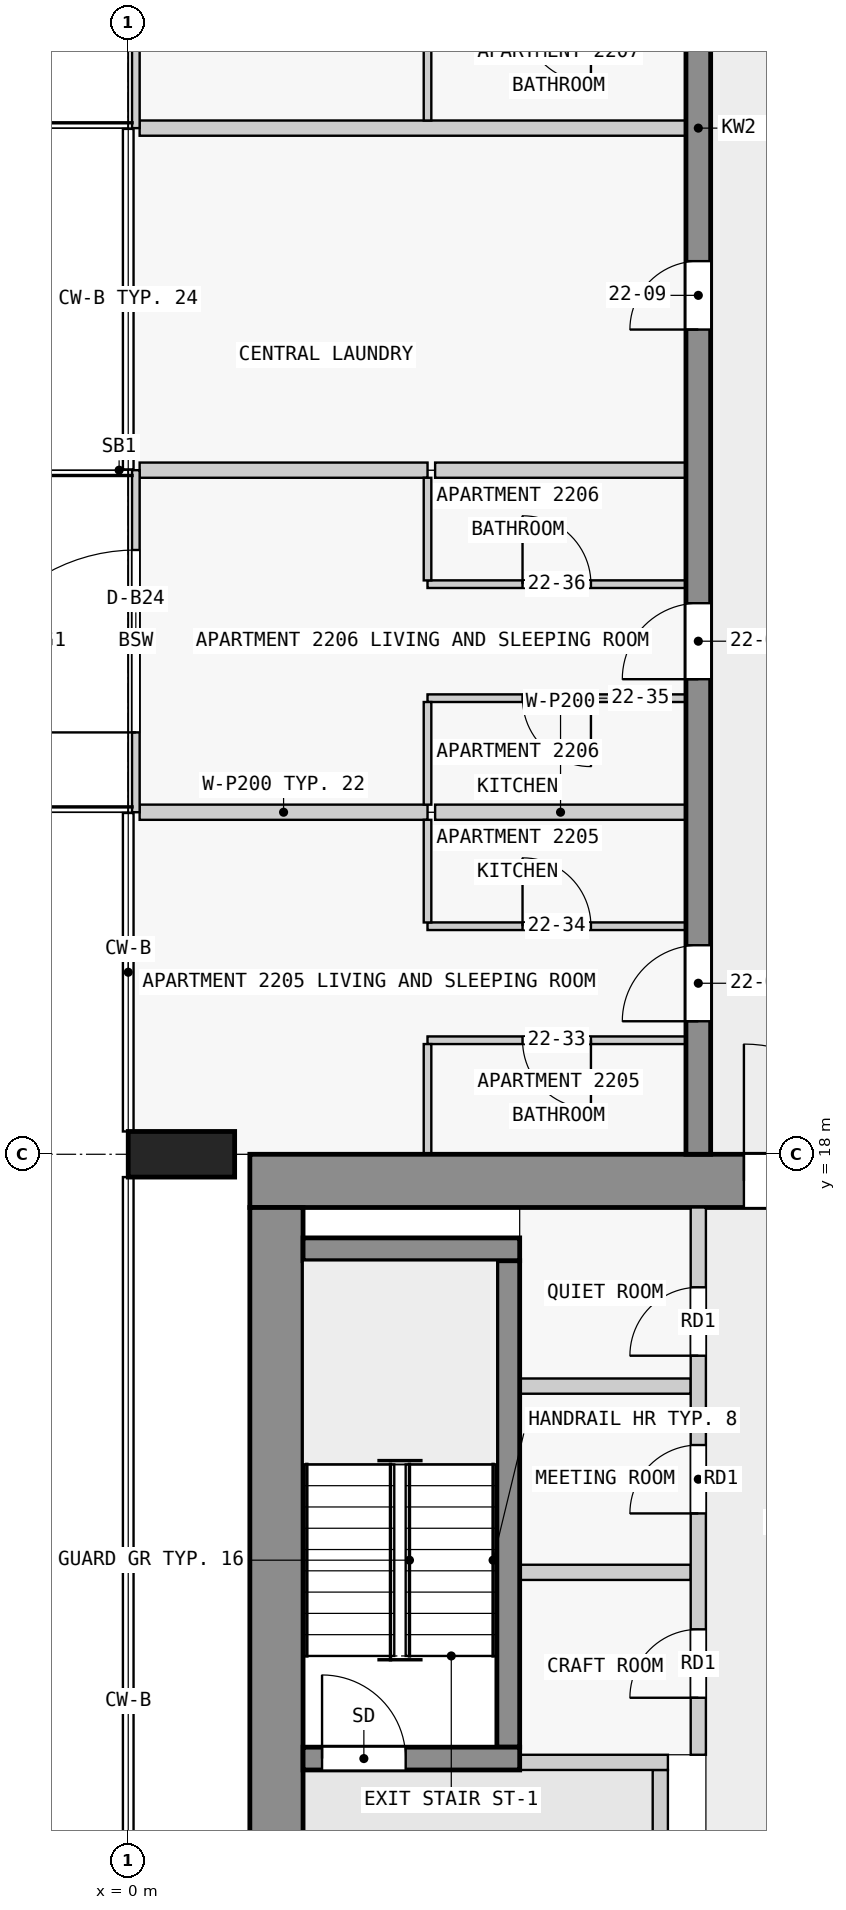
"""IFC4 building model, lengths in metres.
Left out: names, types, materials, properties, quantities, classifications, styles, units other than length and angle.
Written with IfcOpenShell. Run it as: python <this file> out.ifc"""

import sys

from ifc_helpers import new_model, si_unit, direction, frame, frame_2d, origin, origin_2d, place, context, subcontext, project, spatial, rectangle, extrude, element, fill, save


model = new_model("IFC4")
c1 = context("Model", 3, precision=1e-05, world=origin(), true_north=direction((0.0, 1.0)))
c2 = subcontext(c1, "Body", "Model", "MODEL_VIEW")
j1 = project(units=[si_unit("LENGTHUNIT", "METRE"), si_unit("PLANEANGLEUNIT", "RADIAN")], contexts=[c1])
p1 = place(None, origin())
s1 = spatial("IfcSite", under=j1, at=p1, CompositionType="ELEMENT")
p2 = place(p1, origin())
s2 = spatial("IfcBuilding", under=s1, at=p2, CompositionType="ELEMENT")
p3 = place(p2, frame((0.0, 0.0, 88.8)))
s3 = spatial("IfcBuildingStorey", under=s2, at=p3, CompositionType="ELEMENT", Elevation=88.8)
p4 = place(p3, frame((0.7, 18.0, 0.0), z_axis=(0.0, 0.0, 1.0), x_axis=(0.0, 1.0, 0.0)))
e1 = element("IfcColumn", 1, at=p4, inside=s3, PredefinedType="COLUMN", context=c2, shape_type="SweptSolid", body=[
    extrude(rectangle(XDim=0.6, YDim=1.4, at=origin_2d()), origin(), (0.0, 0.0, 1.0), 3.5),
])
p5 = place(p3, frame((1.6, 17.65, 0.0), z_axis=(0.0, 0.0, 1.0), x_axis=(1.0, 0.0, 0.0)))
e2 = element("IfcWall", 2, at=p5, inside=s3, PredefinedType="SHEAR", context=c2, shape_type="SweptSolid", body=[
    extrude(rectangle(XDim=20.9, YDim=0.7, at=frame_2d((10.45, 0.0))), origin(), (0.0, 0.0, 1.0), 3.25),
])
p6 = place(p5, frame((6.5, 0.0, 0.0)))
e3 = element("IfcOpeningElement", 3, at=p6, cuts=e2, PredefinedType="OPENING", context=c2, shape_type="SweptSolid", body=[
    extrude(rectangle(XDim=1.8, YDim=2.1, at=frame_2d((0.9, 1.05))), frame((0.0, 0.36, 0.0), z_axis=(0.0, -1.0, 0.0), x_axis=(1.0, 0.0, 0.0)), (0.0, 0.0, 1.0), 0.72),
])
p7 = place(p3, frame((1.95, 2.5, 0.0), z_axis=(0.0, 0.0, 1.0), x_axis=(0.0, 1.0, 0.0)))
e4 = element("IfcWall", 4, at=p7, inside=s3, PredefinedType="SHEAR", context=c2, shape_type="SweptSolid", body=[
    extrude(rectangle(XDim=14.8, YDim=0.7, at=frame_2d((7.4, 0.0))), origin(), (0.0, 0.0, 1.0), 3.25),
])
p8 = place(p3, frame((2.3, 10.05, 0.0), z_axis=(0.0, 0.0, 1.0), x_axis=(1.0, 0.0, 0.0)))
e5 = element("IfcWall", 5, at=p8, inside=s3, PredefinedType="SHEAR", context=c2, shape_type="SweptSolid", body=[
    extrude(rectangle(XDim=2.85, YDim=0.3, at=frame_2d((1.425, 0.0))), origin(), (0.0, 0.0, 1.0), 3.25),
])
p9 = place(p8, frame((0.25, 0.0, 0.0)))
e6 = element("IfcOpeningElement", 6, at=p9, cuts=e5, PredefinedType="OPENING", context=c2, shape_type="SweptSolid", body=[
    extrude(rectangle(XDim=1.1, YDim=2.1, at=frame_2d((0.55, 1.05))), frame((0.0, 0.16, 0.0), z_axis=(0.0, -1.0, 0.0), x_axis=(1.0, 0.0, 0.0)), (0.0, 0.0, 1.0), 0.32),
])
p10 = place(p3, frame((5.0, 10.2, 0.0), z_axis=(0.0, 0.0, 1.0), x_axis=(0.0, 1.0, 0.0)))
e7 = element("IfcWall", 7, at=p10, inside=s3, PredefinedType="SHEAR", context=c2, shape_type="SweptSolid", body=[
    extrude(rectangle(XDim=6.4, YDim=0.3, at=frame_2d((3.2, 0.0))), origin(), (0.0, 0.0, 1.0), 3.25),
])
p11 = place(p3, frame((2.3, 16.75, 0.0), z_axis=(0.0, 0.0, 1.0), x_axis=(1.0, 0.0, 0.0)))
e8 = element("IfcWall", 8, at=p11, inside=s3, PredefinedType="SHEAR", context=c2, shape_type="SweptSolid", body=[
    extrude(rectangle(XDim=2.85, YDim=0.3, at=frame_2d((1.425, 0.0))), origin(), (0.0, 0.0, 1.0), 3.25),
])
p12 = place(p3, frame((7.5, 18.0, 0.0), z_axis=(0.0, 0.0, 1.0), x_axis=(0.0, 1.0, 0.0)))
e9 = element("IfcWall", 9, at=p12, inside=s3, PredefinedType="SHEAR", context=c2, shape_type="SweptSolid", body=[
    extrude(rectangle(XDim=27.0, YDim=0.325, at=frame_2d((13.5, 0.0))), origin(), (0.0, 0.0, 1.0), 3.25),
])
p13 = place(p12, frame((1.75, 0.0, 0.0)))
e10 = element("IfcOpeningElement", 10, at=p13, cuts=e9, PredefinedType="OPENING", context=c2, shape_type="SweptSolid", body=[
    extrude(rectangle(XDim=1.0, YDim=2.1, at=frame_2d((0.5, 1.05))), frame((0.0, 0.172, 0.0), z_axis=(0.0, -1.0, 0.0), x_axis=(1.0, 0.0, 0.0)), (0.0, 0.0, 1.0), 0.345),
])
p14 = place(p12, frame((6.25, 0.0, 0.0)))
e11 = element("IfcOpeningElement", 11, at=p14, cuts=e9, PredefinedType="OPENING", context=c2, shape_type="SweptSolid", body=[
    extrude(rectangle(XDim=1.0, YDim=2.1, at=frame_2d((0.5, 1.05))), frame((0.0, 0.172, 0.0), z_axis=(0.0, -1.0, 0.0), x_axis=(1.0, 0.0, 0.0)), (0.0, 0.0, 1.0), 0.345),
])
p15 = place(p12, frame((10.85, 0.0, 0.0)))
e12 = element("IfcOpeningElement", 12, at=p15, cuts=e9, PredefinedType="OPENING", context=c2, shape_type="SweptSolid", body=[
    extrude(rectangle(XDim=0.9, YDim=2.1, at=frame_2d((0.45, 1.05))), frame((0.0, 0.172, 0.0), z_axis=(0.0, -1.0, 0.0), x_axis=(1.0, 0.0, 0.0)), (0.0, 0.0, 1.0), 0.345),
])
p16 = place(p12, frame((15.25, 0.0, 0.0)))
e13 = element("IfcOpeningElement", 13, at=p16, cuts=e9, PredefinedType="OPENING", context=c2, shape_type="SweptSolid", body=[
    extrude(rectangle(XDim=1.0, YDim=2.1, at=frame_2d((0.5, 1.05))), frame((0.0, 0.172, 0.0), z_axis=(0.0, -1.0, 0.0), x_axis=(1.0, 0.0, 0.0)), (0.0, 0.0, 1.0), 0.345),
])
p17 = place(p12, frame((19.85, 0.0, 0.0)))
e14 = element("IfcOpeningElement", 14, at=p17, cuts=e9, PredefinedType="OPENING", context=c2, shape_type="SweptSolid", body=[
    extrude(rectangle(XDim=0.9, YDim=2.1, at=frame_2d((0.45, 1.05))), frame((0.0, 0.172, 0.0), z_axis=(0.0, -1.0, 0.0), x_axis=(1.0, 0.0, 0.0)), (0.0, 0.0, 1.0), 0.345),
])
p18 = place(p12, frame((23.25, 0.0, 0.0)))
e15 = element("IfcOpeningElement", 15, at=p18, cuts=e9, PredefinedType="OPENING", context=c2, shape_type="SweptSolid", body=[
    extrude(rectangle(XDim=0.9, YDim=2.1, at=frame_2d((0.45, 1.05))), frame((0.0, 0.172, 0.0), z_axis=(0.0, -1.0, 0.0), x_axis=(1.0, 0.0, 0.0)), (0.0, 0.0, 1.0), 0.345),
])
p19 = place(p12, frame((25.45, 0.0, 0.0)))
e16 = element("IfcOpeningElement", 16, at=p19, cuts=e9, PredefinedType="OPENING", context=c2, shape_type="SweptSolid", body=[
    extrude(rectangle(XDim=1.0, YDim=2.1, at=frame_2d((0.5, 1.05))), frame((0.0, 0.172, 0.0), z_axis=(0.0, -1.0, 0.0), x_axis=(1.0, 0.0, 0.0)), (0.0, 0.0, 1.0), 0.345),
])
p20 = place(p3, frame((0.1, 22.5, 0.0), z_axis=(0.0, 0.0, 1.0), x_axis=(0.0, 1.0, 0.0)))
e17 = element("IfcWall", 17, at=p20, inside=s3, PredefinedType="STANDARD", context=c2, shape_type="SweptSolid", body=[
    extrude(rectangle(XDim=4.5, YDim=0.1, at=frame_2d((2.25, 0.0))), origin(), (0.0, 0.0, 1.0), 3.25),
])
p21 = place(p20, frame((1.05, 0.0, 0.0)))
e18 = element("IfcOpeningElement", 18, at=p21, cuts=e17, PredefinedType="OPENING", context=c2, shape_type="SweptSolid", body=[
    extrude(rectangle(XDim=2.4, YDim=2.4, at=frame_2d((1.2, 1.2))), frame((0.0, 0.06, 0.0), z_axis=(0.0, -1.0, 0.0), x_axis=(1.0, 0.0, 0.0)), (0.0, 0.0, 1.0), 0.12),
])
p22 = place(p3, frame((0.1, 31.5, 0.0), z_axis=(0.0, 0.0, 1.0), x_axis=(0.0, 1.0, 0.0)))
e19 = element("IfcWall", 19, at=p22, inside=s3, PredefinedType="STANDARD", context=c2, shape_type="SweptSolid", body=[
    extrude(rectangle(XDim=4.5, YDim=0.1, at=frame_2d((2.25, 0.0))), origin(), (0.0, 0.0, 1.0), 3.25),
])
p23 = place(p22, frame((1.05, 0.0, 0.0)))
e20 = element("IfcOpeningElement", 20, at=p23, cuts=e19, PredefinedType="OPENING", context=c2, shape_type="SweptSolid", body=[
    extrude(rectangle(XDim=2.4, YDim=2.4, at=frame_2d((1.2, 1.2))), frame((0.0, 0.06, 0.0), z_axis=(0.0, -1.0, 0.0), x_axis=(1.0, 0.0, 0.0)), (0.0, 0.0, 1.0), 0.12),
])
p24 = place(p3, frame((7.0, 5.9, 0.0), z_axis=(0.0, 0.0, 1.0), x_axis=(0.0, 1.0, 0.0)))
e21 = element("IfcWall", 21, at=p24, inside=s3, PredefinedType="PARTITIONING", context=c2, shape_type="SweptSolid", body=[
    extrude(rectangle(XDim=4.0, YDim=0.2, at=frame_2d((2.0, 0.0))), origin(), (0.0, 0.0, 1.0), 3.25),
])
p25 = place(p24, frame((0.45, 0.0, 0.0)))
e22 = element("IfcOpeningElement", 22, at=p25, cuts=e21, PredefinedType="OPENING", context=c2, shape_type="SweptSolid", body=[
    extrude(rectangle(XDim=1.1, YDim=2.1, at=frame_2d((0.55, 1.05))), frame((0.0, 0.11, 0.0), z_axis=(0.0, -1.0, 0.0), x_axis=(1.0, 0.0, 0.0)), (0.0, 0.0, 1.0), 0.22),
])
p26 = place(p3, frame((5.15, 10.0, 0.0), z_axis=(0.0, 0.0, 1.0), x_axis=(1.0, 0.0, 0.0)))
e23 = element("IfcWall", 23, at=p26, inside=s3, PredefinedType="PARTITIONING", context=c2, shape_type="SweptSolid", body=[
    extrude(rectangle(XDim=1.95, YDim=0.2, at=frame_2d((0.975, 0.0))), origin(), (0.0, 0.0, 1.0), 3.25),
])
p27 = place(p3, frame((7.5, 10.1, 0.0), z_axis=(0.0, 0.0, 1.0), x_axis=(0.0, 1.0, 0.0)))
e24 = element("IfcWall", 24, at=p27, inside=s3, PredefinedType="PARTITIONING", context=c2, shape_type="SweptSolid", body=[
    extrude(rectangle(XDim=7.2, YDim=0.2, at=frame_2d((3.6, 0.0))), origin(), (0.0, 0.0, 1.0), 3.25),
])
p28 = place(p27, frame((0.75, 0.0, 0.0)))
e25 = element("IfcOpeningElement", 25, at=p28, cuts=e24, PredefinedType="OPENING", context=c2, shape_type="SweptSolid", body=[
    extrude(rectangle(XDim=0.9, YDim=2.1, at=frame_2d((0.45, 1.05))), frame((0.0, 0.11, 0.0), z_axis=(0.0, -1.0, 0.0), x_axis=(1.0, 0.0, 0.0)), (0.0, 0.0, 1.0), 0.22),
])
p29 = place(p27, frame((3.175, 0.0, 0.0)))
e26 = element("IfcOpeningElement", 26, at=p29, cuts=e24, PredefinedType="OPENING", context=c2, shape_type="SweptSolid", body=[
    extrude(rectangle(XDim=0.9, YDim=2.1, at=frame_2d((0.45, 1.05))), frame((0.0, 0.11, 0.0), z_axis=(0.0, -1.0, 0.0), x_axis=(1.0, 0.0, 0.0)), (0.0, 0.0, 1.0), 0.22),
])
p30 = place(p27, frame((5.25, 0.0, 0.0)))
e27 = element("IfcOpeningElement", 27, at=p30, cuts=e24, PredefinedType="OPENING", context=c2, shape_type="SweptSolid", body=[
    extrude(rectangle(XDim=0.9, YDim=2.1, at=frame_2d((0.45, 1.05))), frame((0.0, 0.11, 0.0), z_axis=(0.0, -1.0, 0.0), x_axis=(1.0, 0.0, 0.0)), (0.0, 0.0, 1.0), 0.22),
])
for number, where, z_axis, x_axis in (
    (28, (5.15, 12.5, 0.0), (0.0, 0.0, 1.0), (1.0, 0.0, 0.0)),
    (29, (5.15, 14.95, 0.0), (0.0, 0.0, 1.0), (1.0, 0.0, 0.0)),
):
    element("IfcWall", number, at=place(p3, frame(where, z_axis=z_axis, x_axis=x_axis)), inside=s3, PredefinedType="PARTITIONING", context=c2, shape_type="SweptSolid", body=[
        extrude(rectangle(XDim=2.25, YDim=0.2, at=frame_2d((1.125, 0.0))), origin(), (0.0, 0.0, 1.0), 3.25),
    ])
p31 = place(p3, frame((7.337, 19.5, 0.0), z_axis=(0.0, 0.0, 1.0), x_axis=(-1.0, 0.0, 0.0)))
e30 = element("IfcWall", 30, at=p31, inside=s3, PredefinedType="PARTITIONING", context=c2, shape_type="SweptSolid", body=[
    extrude(rectangle(XDim=3.4, YDim=0.1, at=frame_2d((1.7, 0.0))), origin(), (0.0, 0.0, 1.0), 3.25),
])
p32 = place(p31, frame((1.25, 0.0, 0.0)))
e31 = element("IfcOpeningElement", 31, at=p32, cuts=e30, PredefinedType="OPENING", context=c2, shape_type="SweptSolid", body=[
    extrude(rectangle(XDim=0.9, YDim=2.1, at=frame_2d((0.45, 1.05))), frame((0.0, 0.06, 0.0), z_axis=(0.0, -1.0, 0.0), x_axis=(1.0, 0.0, 0.0)), (0.0, 0.0, 1.0), 0.12),
])
p33 = place(p3, frame((3.938, 21.0, 0.0), z_axis=(0.0, 0.0, 1.0), x_axis=(1.0, 0.0, 0.0)))
e32 = element("IfcWall", 32, at=p33, inside=s3, PredefinedType="PARTITIONING", context=c2, shape_type="SweptSolid", body=[
    extrude(rectangle(XDim=3.4, YDim=0.1, at=frame_2d((1.7, 0.0))), origin(), (0.0, 0.0, 1.0), 3.25),
])
p34 = place(p33, frame((1.25, 0.0, 0.0)))
e33 = element("IfcOpeningElement", 33, at=p34, cuts=e32, PredefinedType="OPENING", context=c2, shape_type="SweptSolid", body=[
    extrude(rectangle(XDim=0.9, YDim=2.1, at=frame_2d((0.45, 1.05))), frame((0.0, 0.06, 0.0), z_axis=(0.0, -1.0, 0.0), x_axis=(1.0, 0.0, 0.0)), (0.0, 0.0, 1.0), 0.12),
])
p35 = place(p3, frame((7.337, 22.5, 0.0), z_axis=(0.0, 0.0, 1.0), x_axis=(-1.0, 0.0, 0.0)))
e34 = element("IfcWall", 34, at=p35, inside=s3, PredefinedType="PARTITIONING", context=c2, shape_type="SweptSolid", body=[
    extrude(rectangle(XDim=3.3, YDim=0.2, at=frame_2d((1.65, 0.0))), origin(), (0.0, 0.0, 1.0), 3.25),
])
p36 = place(p3, frame((0.15, 22.5, 0.0), z_axis=(0.0, 0.0, 1.0), x_axis=(1.0, 0.0, 0.0)))
e35 = element("IfcWall", 35, at=p36, inside=s3, PredefinedType="PARTITIONING", context=c2, shape_type="SweptSolid", body=[
    extrude(rectangle(XDim=3.788, YDim=0.2, at=frame_2d((1.894, 0.0))), origin(), (0.0, 0.0, 1.0), 3.25),
])
p37 = place(p3, frame((7.337, 24.0, 0.0), z_axis=(0.0, 0.0, 1.0), x_axis=(-1.0, 0.0, 0.0)))
e36 = element("IfcWall", 36, at=p37, inside=s3, PredefinedType="PARTITIONING", context=c2, shape_type="SweptSolid", body=[
    extrude(rectangle(XDim=3.4, YDim=0.1, at=frame_2d((1.7, 0.0))), origin(), (0.0, 0.0, 1.0), 3.25),
])
p38 = place(p37, frame((1.25, 0.0, 0.0)))
e37 = element("IfcOpeningElement", 37, at=p38, cuts=e36, PredefinedType="OPENING", context=c2, shape_type="SweptSolid", body=[
    extrude(rectangle(XDim=0.9, YDim=2.1, at=frame_2d((0.45, 1.05))), frame((0.0, 0.06, 0.0), z_axis=(0.0, -1.0, 0.0), x_axis=(1.0, 0.0, 0.0)), (0.0, 0.0, 1.0), 0.12),
])
p39 = place(p3, frame((3.938, 25.5, 0.0), z_axis=(0.0, 0.0, 1.0), x_axis=(1.0, 0.0, 0.0)))
e38 = element("IfcWall", 38, at=p39, inside=s3, PredefinedType="PARTITIONING", context=c2, shape_type="SweptSolid", body=[
    extrude(rectangle(XDim=3.4, YDim=0.1, at=frame_2d((1.7, 0.0))), origin(), (0.0, 0.0, 1.0), 3.25),
])
p40 = place(p39, frame((1.25, 0.0, 0.0)))
e39 = element("IfcOpeningElement", 39, at=p40, cuts=e38, PredefinedType="OPENING", context=c2, shape_type="SweptSolid", body=[
    extrude(rectangle(XDim=0.9, YDim=2.1, at=frame_2d((0.45, 1.05))), frame((0.0, 0.06, 0.0), z_axis=(0.0, -1.0, 0.0), x_axis=(1.0, 0.0, 0.0)), (0.0, 0.0, 1.0), 0.12),
])
p41 = place(p3, frame((7.337, 27.0, 0.0), z_axis=(0.0, 0.0, 1.0), x_axis=(-1.0, 0.0, 0.0)))
e40 = element("IfcWall", 40, at=p41, inside=s3, PredefinedType="PARTITIONING", context=c2, shape_type="SweptSolid", body=[
    extrude(rectangle(XDim=3.3, YDim=0.2, at=frame_2d((1.65, 0.0))), origin(), (0.0, 0.0, 1.0), 3.25),
])
p42 = place(p3, frame((0.15, 27.0, 0.0), z_axis=(0.0, 0.0, 1.0), x_axis=(1.0, 0.0, 0.0)))
e41 = element("IfcWall", 41, at=p42, inside=s3, PredefinedType="PARTITIONING", context=c2, shape_type="SweptSolid", body=[
    extrude(rectangle(XDim=3.788, YDim=0.2, at=frame_2d((1.894, 0.0))), origin(), (0.0, 0.0, 1.0), 3.25),
])
p43 = place(p3, frame((7.337, 31.5, 0.0), z_axis=(0.0, 0.0, 1.0), x_axis=(-1.0, 0.0, 0.0)))
e42 = element("IfcWall", 42, at=p43, inside=s3, PredefinedType="PARTITIONING", context=c2, shape_type="SweptSolid", body=[
    extrude(rectangle(XDim=7.188, YDim=0.2, at=frame_2d((3.594, 0.0))), origin(), (0.0, 0.0, 1.0), 3.25),
])
p44 = place(p3, frame((3.938, 19.45, 0.0), z_axis=(0.0, 0.0, 1.0), x_axis=(0.0, -1.0, 0.0)))
e43 = element("IfcWall", 43, at=p44, inside=s3, PredefinedType="PARTITIONING", context=c2, shape_type="SweptSolid", body=[
    extrude(rectangle(XDim=1.45, YDim=0.1, at=frame_2d((0.725, 0.0))), origin(), (0.0, 0.0, 1.0), 3.25),
])
for number, where, z_axis, x_axis in (
    (44, (3.938, 22.4, 0.0), (0.0, 0.0, 1.0), (0.0, -1.0, 0.0)),
    (45, (3.938, 23.95, 0.0), (0.0, 0.0, 1.0), (0.0, -1.0, 0.0)),
    (46, (3.938, 26.9, 0.0), (0.0, 0.0, 1.0), (0.0, -1.0, 0.0)),
    (47, (3.938, 32.95, 0.0), (0.0, 0.0, 1.0), (0.0, -1.0, 0.0)),
):
    element("IfcWall", number, at=place(p3, frame(where, z_axis=z_axis, x_axis=x_axis)), inside=s3, PredefinedType="PARTITIONING", context=c2, shape_type="SweptSolid", body=[
        extrude(rectangle(XDim=1.35, YDim=0.1, at=frame_2d((0.675, 0.0))), origin(), (0.0, 0.0, 1.0), 3.25),
    ])
p45 = place(p21, origin())
e48 = element("IfcDoor", 48, at=p45, inside=s3, OperationType="SINGLE_SWING_LEFT", PredefinedType="DOOR", context=c2, shape_type="SweptSolid", body=[
    extrude(rectangle(XDim=2.4, YDim=2.4, at=frame_2d((1.2, 1.2))), frame((0.0, 0.025, 0.0), z_axis=(0.0, -1.0, 0.0), x_axis=(1.0, 0.0, 0.0)), (0.0, 0.0, 1.0), 0.05),
])
fill(e18, e48)
p46 = place(p9, origin())
e49 = element("IfcDoor", 49, at=p46, inside=s3, OperationType="SINGLE_SWING_RIGHT", PredefinedType="DOOR", context=c2, shape_type="SweptSolid", body=[
    extrude(rectangle(XDim=1.1, YDim=2.1, at=frame_2d((0.55, 1.05))), frame((0.0, 0.025, 0.0), z_axis=(0.0, -1.0, 0.0), x_axis=(1.0, 0.0, 0.0)), (0.0, 0.0, 1.0), 0.05),
])
fill(e6, e49)
p47 = place(p6, origin())
e50 = element("IfcDoor", 50, at=p47, inside=s3, OperationType="DOUBLE_DOOR_SINGLE_SWING", PredefinedType="DOOR", context=c2, shape_type="SweptSolid", body=[
    extrude(rectangle(XDim=1.8, YDim=2.1, at=frame_2d((0.9, 1.05))), frame((0.0, 0.025, 0.0), z_axis=(0.0, -1.0, 0.0), x_axis=(1.0, 0.0, 0.0)), (0.0, 0.0, 1.0), 0.05),
])
fill(e3, e50)
p48 = place(p28, origin())
e51 = element("IfcDoor", 51, at=p48, inside=s3, OperationType="SINGLE_SWING_RIGHT", PredefinedType="DOOR", context=c2, shape_type="SweptSolid", body=[
    extrude(rectangle(XDim=0.9, YDim=2.1, at=frame_2d((0.45, 1.05))), frame((0.0, 0.025, 0.0), z_axis=(0.0, -1.0, 0.0), x_axis=(1.0, 0.0, 0.0)), (0.0, 0.0, 1.0), 0.05),
])
fill(e25, e51)
p49 = place(p29, origin())
e52 = element("IfcDoor", 52, at=p49, inside=s3, OperationType="SINGLE_SWING_RIGHT", PredefinedType="DOOR", context=c2, shape_type="SweptSolid", body=[
    extrude(rectangle(XDim=0.9, YDim=2.1, at=frame_2d((0.45, 1.05))), frame((0.0, 0.025, 0.0), z_axis=(0.0, -1.0, 0.0), x_axis=(1.0, 0.0, 0.0)), (0.0, 0.0, 1.0), 0.05),
])
fill(e26, e52)
p50 = place(p30, origin())
e53 = element("IfcDoor", 53, at=p50, inside=s3, OperationType="SINGLE_SWING_RIGHT", PredefinedType="DOOR", context=c2, shape_type="SweptSolid", body=[
    extrude(rectangle(XDim=0.9, YDim=2.1, at=frame_2d((0.45, 1.05))), frame((0.0, 0.025, 0.0), z_axis=(0.0, -1.0, 0.0), x_axis=(1.0, 0.0, 0.0)), (0.0, 0.0, 1.0), 0.05),
])
fill(e27, e53)
p51 = place(p13, origin())
e54 = element("IfcDoor", 54, at=p51, inside=s3, OperationType="SINGLE_SWING_LEFT", PredefinedType="DOOR", context=c2, shape_type="SweptSolid", body=[
    extrude(rectangle(XDim=1.0, YDim=2.1, at=frame_2d((0.5, 1.05))), frame((0.0, 0.025, 0.0), z_axis=(0.0, -1.0, 0.0), x_axis=(1.0, 0.0, 0.0)), (0.0, 0.0, 1.0), 0.05),
])
fill(e10, e54)
p52 = place(p14, origin())
e55 = element("IfcDoor", 55, at=p52, inside=s3, OperationType="SINGLE_SWING_LEFT", PredefinedType="DOOR", context=c2, shape_type="SweptSolid", body=[
    extrude(rectangle(XDim=1.0, YDim=2.1, at=frame_2d((0.5, 1.05))), frame((0.0, 0.025, 0.0), z_axis=(0.0, -1.0, 0.0), x_axis=(1.0, 0.0, 0.0)), (0.0, 0.0, 1.0), 0.05),
])
fill(e11, e55)
p53 = place(p15, origin())
e56 = element("IfcDoor", 56, at=p53, inside=s3, OperationType="SINGLE_SWING_LEFT", PredefinedType="DOOR", context=c2, shape_type="SweptSolid", body=[
    extrude(rectangle(XDim=0.9, YDim=2.1, at=frame_2d((0.45, 1.05))), frame((0.0, 0.025, 0.0), z_axis=(0.0, -1.0, 0.0), x_axis=(1.0, 0.0, 0.0)), (0.0, 0.0, 1.0), 0.05),
])
fill(e12, e56)
p54 = place(p32, origin())
e57 = element("IfcDoor", 57, at=p54, inside=s3, OperationType="SINGLE_SWING_LEFT", PredefinedType="DOOR", context=c2, shape_type="SweptSolid", body=[
    extrude(rectangle(XDim=0.9, YDim=2.1, at=frame_2d((0.45, 1.05))), frame((0.0, 0.025, 0.0), z_axis=(0.0, -1.0, 0.0), x_axis=(1.0, 0.0, 0.0)), (0.0, 0.0, 1.0), 0.05),
])
fill(e31, e57)
p55 = place(p34, origin())
e58 = element("IfcDoor", 58, at=p55, inside=s3, OperationType="SINGLE_SWING_LEFT", PredefinedType="DOOR", context=c2, shape_type="SweptSolid", body=[
    extrude(rectangle(XDim=0.9, YDim=2.1, at=frame_2d((0.45, 1.05))), frame((0.0, 0.025, 0.0), z_axis=(0.0, -1.0, 0.0), x_axis=(1.0, 0.0, 0.0)), (0.0, 0.0, 1.0), 0.05),
])
fill(e33, e58)
p56 = place(p38, origin())
e59 = element("IfcDoor", 59, at=p56, inside=s3, OperationType="SINGLE_SWING_LEFT", PredefinedType="DOOR", context=c2, shape_type="SweptSolid", body=[
    extrude(rectangle(XDim=0.9, YDim=2.1, at=frame_2d((0.45, 1.05))), frame((0.0, 0.025, 0.0), z_axis=(0.0, -1.0, 0.0), x_axis=(1.0, 0.0, 0.0)), (0.0, 0.0, 1.0), 0.05),
])
fill(e37, e59)
p57 = place(p40, origin())
e60 = element("IfcDoor", 60, at=p57, inside=s3, OperationType="SINGLE_SWING_LEFT", PredefinedType="DOOR", context=c2, shape_type="SweptSolid", body=[
    extrude(rectangle(XDim=0.9, YDim=2.1, at=frame_2d((0.45, 1.05))), frame((0.0, 0.025, 0.0), z_axis=(0.0, -1.0, 0.0), x_axis=(1.0, 0.0, 0.0)), (0.0, 0.0, 1.0), 0.05),
])
fill(e39, e60)
save(model, sys.argv[1])
